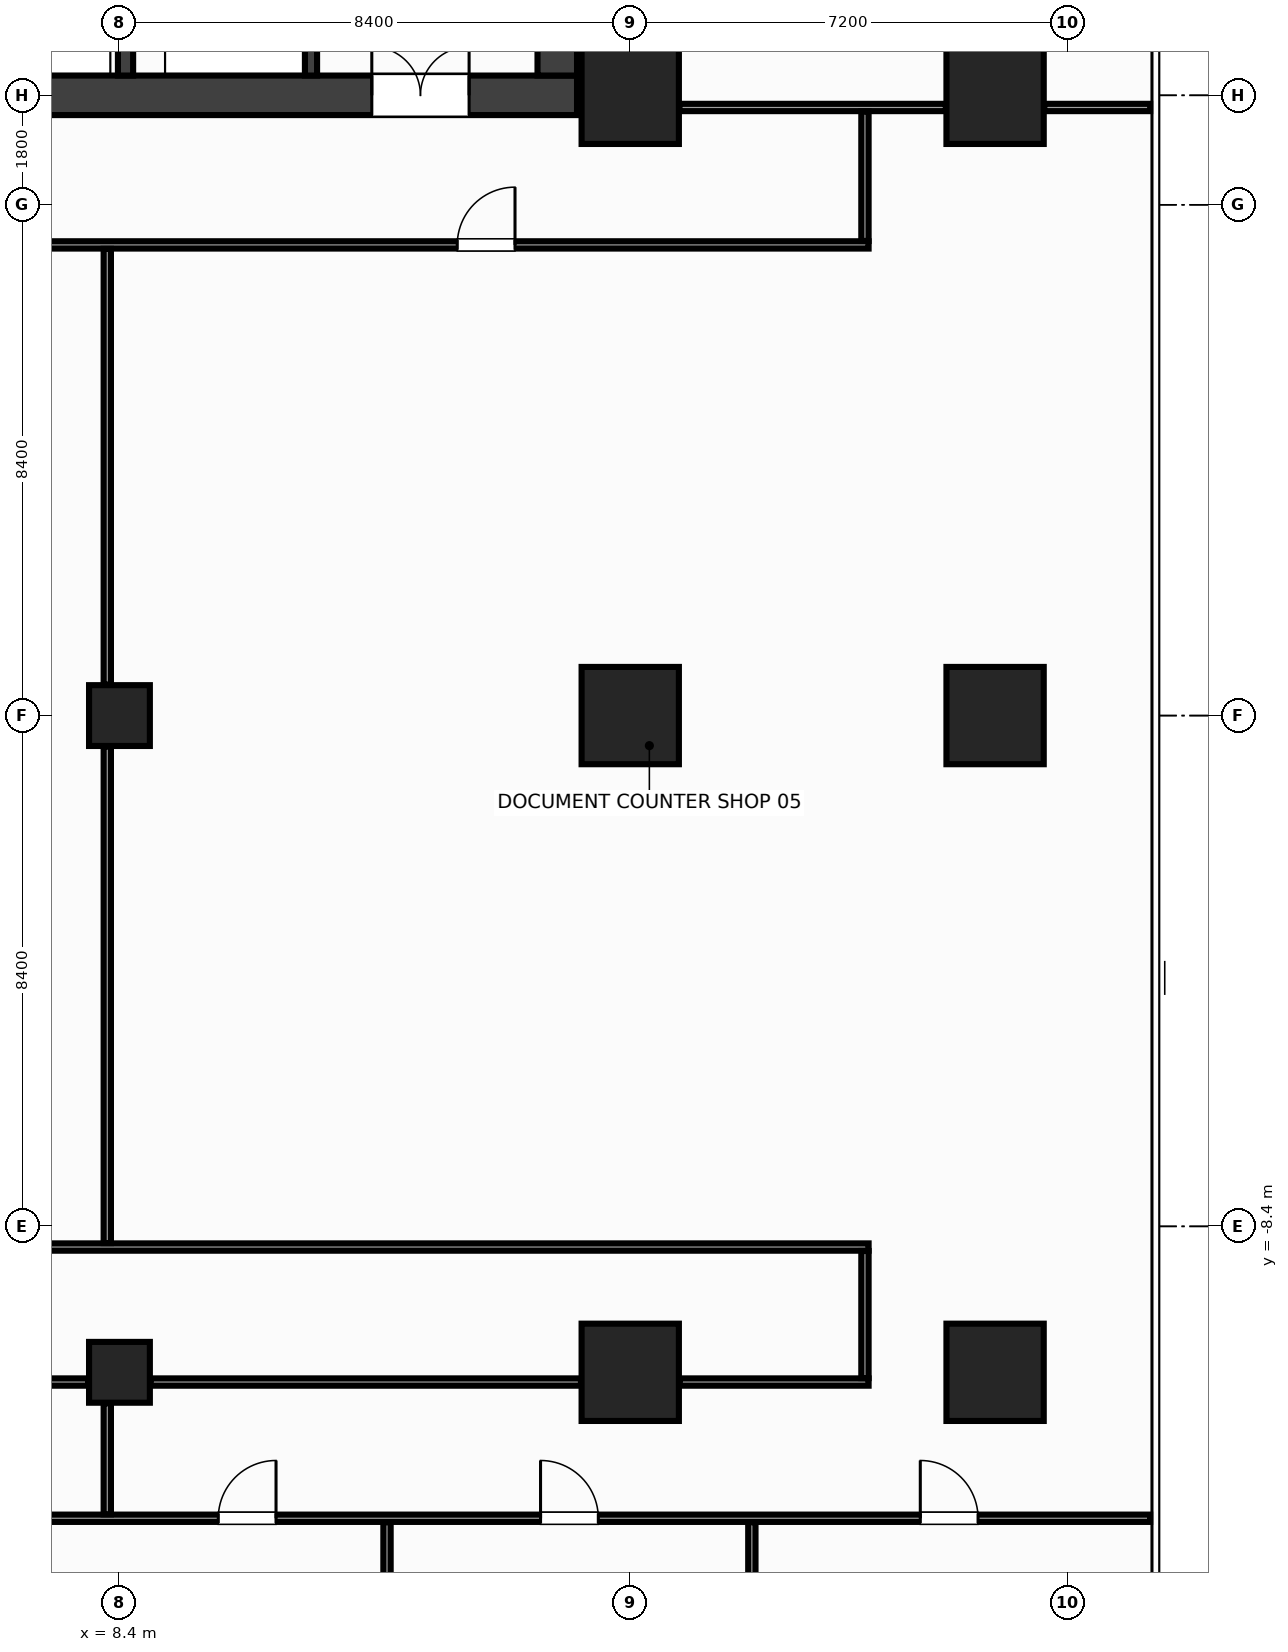
"""IFC4 building model, lengths in metres.
Left out: names, types, materials, properties, quantities, classifications, styles, units other than length and angle.
Written with IfcOpenShell. Run it as: python <this file> out.ifc"""

import sys

from ifc_helpers import new_model, si_unit, direction, frame, frame_2d, origin, origin_2d, place, context, subcontext, project, spatial, rectangle, hollow_rectangle, extrude, source, transform, mapped, element, fill, save


model = new_model("IFC4")
c1 = context("Model", 3, precision=1e-05, world=origin(), true_north=direction((0.0, 1.0)))
c2 = subcontext(c1, "Body", "Model", "MODEL_VIEW")
j1 = project(units=[si_unit("LENGTHUNIT", "METRE"), si_unit("PLANEANGLEUNIT", "RADIAN")], contexts=[c1])
p1 = place(None, origin())
s1 = spatial("IfcSite", under=j1, at=p1, CompositionType="ELEMENT")
p2 = place(p1, origin())
s2 = spatial("IfcBuilding", under=s1, at=p2, CompositionType="ELEMENT")
p3 = place(p2, frame((0.0, 0.0, 81.2)))
s3 = spatial("IfcBuildingStorey", under=s2, at=p3, CompositionType="ELEMENT", Elevation=81.2)
m1 = source(origin(), c2, "Body", "SweptSolid", [
    extrude(rectangle(XDim=31.85, YDim=0.65, at=frame_2d((15.925, 0.0))), origin(), (0.0, 0.0, 1.0), 3.6),
])
p4 = place(p3, frame((-15.925, 10.2, 0.0), z_axis=(0.0, 0.0, 1.0), x_axis=(1.0, 0.0, 0.0)))
e1 = element("IfcWall", 1, at=p4, inside=s3, PredefinedType="SHEAR", context=c2, shape_type="MappedRepresentation", body=[
    mapped(m1, transform((0.0, 0.0, 0.0), x_axis=(1.0, 0.0, 0.0), y_axis=(0.0, 1.0, 0.0), z_axis=(0.0, 0.0, 1.0), scale=1.0)),
])
p5 = place(p4, frame((1.775, 0.0, 0.0)))
e2 = element("IfcOpeningElement", 2, at=p5, cuts=e1, PredefinedType="OPENING", context=c2, shape_type="SweptSolid", body=[
    extrude(rectangle(XDim=1.6, YDim=2.15, at=frame_2d((0.8, 1.075))), frame((0.0, 0.337, 0.0), z_axis=(0.0, -1.0, 0.0), x_axis=(1.0, 0.0, 0.0)), (0.0, 0.0, 1.0), 0.674),
])
p6 = place(p4, frame((28.475, 0.0, 0.0)))
e3 = element("IfcOpeningElement", 3, at=p6, cuts=e1, PredefinedType="OPENING", context=c2, shape_type="SweptSolid", body=[
    extrude(rectangle(XDim=1.6, YDim=2.15, at=frame_2d((0.8, 1.075))), frame((0.0, 0.337, 0.0), z_axis=(0.0, -1.0, 0.0), x_axis=(1.0, 0.0, 0.0)), (0.0, 0.0, 1.0), 0.674),
])
p7 = place(p4, frame((15.175, 0.0, 0.0)))
e4 = element("IfcOpeningElement", 4, at=p7, cuts=e1, PredefinedType="OPENING", context=c2, shape_type="SweptSolid", body=[
    extrude(rectangle(XDim=1.5, YDim=2.2, at=frame_2d((0.75, 1.1))), frame((0.0, 0.337, 0.0), z_axis=(0.0, -1.0, 0.0), x_axis=(1.0, 0.0, 0.0)), (0.0, 0.0, 1.0), 0.674),
])
m2 = source(origin(), c2, "Body", "SweptSolid", [
    extrude(rectangle(XDim=12.95, YDim=0.65, at=frame_2d((6.475, 0.0))), origin(), (0.0, 0.0, 1.0), 3.6),
])
p8 = place(p3, frame((15.6, 10.525, 0.0), z_axis=(0.0, 0.0, 1.0), x_axis=(0.0, 1.0, 0.0)))
e5 = element("IfcWall", 5, at=p8, inside=s3, PredefinedType="SHEAR", context=c2, shape_type="MappedRepresentation", body=[
    mapped(m2, transform((0.0, 0.0, 0.0), x_axis=(1.0, 0.0, 0.0), y_axis=(0.0, 1.0, 0.0), z_axis=(0.0, 0.0, 1.0), scale=1.0)),
])
m3 = source(origin(), c2, "Body", "SweptSolid", [
    extrude(rectangle(XDim=12.95, YDim=0.25, at=frame_2d((6.475, 0.0))), origin(), (0.0, 0.0, 1.0), 3.6),
])
p9 = place(p3, frame((8.5, 10.525, 0.0), z_axis=(0.0, 0.0, 1.0), x_axis=(0.0, 1.0, 0.0)))
e6 = element("IfcWall", 6, at=p9, inside=s3, PredefinedType="SHEAR", context=c2, shape_type="MappedRepresentation", body=[
    mapped(m3, transform((0.0, 0.0, 0.0), x_axis=(1.0, 0.0, 0.0), y_axis=(0.0, 1.0, 0.0), z_axis=(0.0, 0.0, 1.0), scale=1.0)),
])
p10 = place(p9, frame((9.925, 0.0, 0.0)))
e7 = element("IfcOpeningElement", 7, at=p10, cuts=e6, PredefinedType="OPENING", context=c2, shape_type="SweptSolid", body=[
    extrude(rectangle(XDim=0.95, YDim=2.15, at=frame_2d((0.475, 1.075))), frame((0.0, 0.137, 0.0), z_axis=(0.0, -1.0, 0.0), x_axis=(1.0, 0.0, 0.0)), (0.0, 0.0, 1.0), 0.274),
])
m4 = source(origin(), c2, "Body", "SweptSolid", [
    extrude(rectangle(XDim=3.125, YDim=0.2, at=frame_2d((1.562, 0.0))), origin(), (0.0, 0.0, 1.0), 3.6),
])
p11 = place(p3, frame((11.55, 10.525, 0.0), z_axis=(0.0, 0.0, 1.0), x_axis=(0.0, 1.0, 0.0)))
e8 = element("IfcWall", 8, at=p11, inside=s3, PredefinedType="SHEAR", context=c2, shape_type="MappedRepresentation", body=[
    mapped(m4, transform((0.0, 0.0, 0.0), x_axis=(1.0, 0.0, 0.0), y_axis=(0.0, 1.0, 0.0), z_axis=(0.0, 0.0, 1.0), scale=1.0)),
])
p12 = place(p11, frame((0.9, 0.0, 0.0)))
e9 = element("IfcOpeningElement", 9, at=p12, cuts=e8, PredefinedType="OPENING", context=c2, shape_type="SweptSolid", body=[
    extrude(rectangle(XDim=1.1, YDim=2.15, at=frame_2d((0.55, 1.075))), frame((0.0, 0.112, 0.0), z_axis=(0.0, -1.0, 0.0), x_axis=(1.0, 0.0, 0.0)), (0.0, 0.0, 1.0), 0.224),
])
m5 = source(origin(), c2, "Body", "SweptSolid", [
    extrude(rectangle(XDim=1.6, YDim=1.6, at=origin_2d()), origin(), (0.0, 0.0, 1.0), 3.6),
])
for number, where, z_axis, x_axis in (
    (10, (16.8, -10.8, 0.0), (0.0, 0.0, 1.0), (1.0, 0.0, 0.0)),
    (11, (16.8, 0.0, 0.0), (0.0, 0.0, 1.0), (1.0, 0.0, 0.0)),
    (12, (16.8, 10.2, 0.0), (0.0, 0.0, 1.0), (1.0, 0.0, 0.0)),
    (13, (22.8, -10.8, 0.0), (0.0, 0.0, 1.0), (1.0, 0.0, 0.0)),
    (14, (22.8, 0.0, 0.0), (0.0, 0.0, 1.0), (1.0, 0.0, 0.0)),
    (15, (22.8, 10.2, 0.0), (0.0, 0.0, 1.0), (1.0, 0.0, 0.0)),
):
    element("IfcColumn", number, at=place(p3, frame(where, z_axis=z_axis, x_axis=x_axis)), inside=s3, PredefinedType="COLUMN", context=c2, shape_type="MappedRepresentation", body=[
        mapped(m5, transform((0.0, 0.0, 0.0), x_axis=(1.0, 0.0, 0.0), y_axis=(0.0, 1.0, 0.0), z_axis=(0.0, 0.0, 1.0), scale=1.0)),
    ])
m6 = source(origin(), c2, "Body", "SweptSolid", [
    extrude(hollow_rectangle(XDim=1.0, YDim=1.0, WallThickness=0.045, at=origin_2d()), origin(), (0.0, 0.0, 1.0), 3.6),
])
for number, where, z_axis, x_axis in (
    (16, (8.4, 0.0, 0.0), (0.0, 0.0, 1.0), (1.0, 0.0, 0.0)),
    (17, (8.4, -10.8, 0.0), (0.0, 0.0, 1.0), (1.0, 0.0, 0.0)),
):
    element("IfcColumn", number, at=place(p3, frame(where, z_axis=z_axis, x_axis=x_axis)), inside=s3, PredefinedType="COLUMN", context=c2, shape_type="MappedRepresentation", body=[
        mapped(m6, transform((0.0, 0.0, 0.0), x_axis=(1.0, 0.0, 0.0), y_axis=(0.0, 1.0, 0.0), z_axis=(0.0, 0.0, 1.0), scale=1.0)),
    ])
m7 = source(origin(), c2, "Body", "SweptSolid", [
    extrude(rectangle(XDim=4.38, YDim=0.12, at=frame_2d((2.19, 0.0))), origin(), (0.0, 0.0, 1.0), 2.745),
])
p13 = place(p3, frame((17.61, 10.0, 0.0), z_axis=(0.0, 0.0, 1.0), x_axis=(1.0, 0.0, 0.0)))
e18 = element("IfcWall", 18, at=p13, inside=s3, PredefinedType="PARTITIONING", context=c2, shape_type="MappedRepresentation", body=[
    mapped(m7, transform((0.0, 0.0, 0.0), x_axis=(1.0, 0.0, 0.0), y_axis=(0.0, 1.0, 0.0), z_axis=(0.0, 0.0, 1.0), scale=1.0)),
])
m8 = source(origin(), c2, "Body", "SweptSolid", [
    extrude(rectangle(XDim=1.74, YDim=0.12, at=frame_2d((0.87, 0.0))), origin(), (0.0, 0.0, 1.0), 3.36),
])
p14 = place(p3, frame((23.61, 10.0, 0.0), z_axis=(0.0, 0.0, 1.0), x_axis=(1.0, 0.0, 0.0)))
e19 = element("IfcWall", 19, at=p14, inside=s3, PredefinedType="PARTITIONING", context=c2, shape_type="MappedRepresentation", body=[
    mapped(m8, transform((0.0, 0.0, 0.0), x_axis=(1.0, 0.0, 0.0), y_axis=(0.0, 1.0, 0.0), z_axis=(0.0, 0.0, 1.0), scale=1.0)),
])
m9 = source(origin(), c2, "Body", "SweptSolid", [
    extrude(rectangle(XDim=22.3, YDim=0.12, at=frame_2d((11.15, 0.0))), origin(), (0.0, 0.0, 1.0), 2.745),
])
p15 = place(p3, frame((-1.58, 7.74, 0.0), z_axis=(0.0, 0.0, 1.0), x_axis=(1.0, 0.0, 0.0)))
e20 = element("IfcWall", 20, at=p15, inside=s3, PredefinedType="PARTITIONING", context=c2, shape_type="MappedRepresentation", body=[
    mapped(m9, transform((0.0, 0.0, 0.0), x_axis=(1.0, 0.0, 0.0), y_axis=(0.0, 1.0, 0.0), z_axis=(0.0, 0.0, 1.0), scale=1.0)),
])
p16 = place(p15, frame((4.445, 0.0, 0.0)))
e21 = element("IfcOpeningElement", 21, at=p16, cuts=e20, PredefinedType="OPENING", context=c2, shape_type="SweptSolid", body=[
    extrude(rectangle(XDim=0.95, YDim=2.15, at=frame_2d((0.475, 1.075))), frame((0.0, 0.072, 0.0), z_axis=(0.0, -1.0, 0.0), x_axis=(1.0, 0.0, 0.0)), (0.0, 0.0, 1.0), 0.144),
])
p17 = place(p15, frame((15.535, 0.0, 0.0)))
e22 = element("IfcOpeningElement", 22, at=p17, cuts=e20, PredefinedType="OPENING", context=c2, shape_type="SweptSolid", body=[
    extrude(rectangle(XDim=0.95, YDim=2.15, at=frame_2d((0.475, 1.075))), frame((0.0, 0.072, 0.0), z_axis=(0.0, -1.0, 0.0), x_axis=(1.0, 0.0, 0.0)), (0.0, 0.0, 1.0), 0.144),
])
p18 = place(p3, frame((-1.58, -8.74, 0.0), z_axis=(0.0, 0.0, 1.0), x_axis=(1.0, 0.0, 0.0)))
e23 = element("IfcWall", 23, at=p18, inside=s3, PredefinedType="PARTITIONING", context=c2, shape_type="MappedRepresentation", body=[
    mapped(m9, transform((0.0, 0.0, 0.0), x_axis=(1.0, 0.0, 0.0), y_axis=(0.0, 1.0, 0.0), z_axis=(0.0, 0.0, 1.0), scale=1.0)),
])
m10 = source(origin(), c2, "Body", "SweptSolid", [
    extrude(rectangle(XDim=7.38, YDim=0.12, at=frame_2d((3.69, 0.0))), origin(), (0.0, 0.0, 1.0), 2.745),
])
p19 = place(p3, frame((0.51, -10.96, 0.0), z_axis=(0.0, 0.0, 1.0), x_axis=(1.0, 0.0, 0.0)))
e24 = element("IfcWall", 24, at=p19, inside=s3, PredefinedType="PARTITIONING", context=c2, shape_type="MappedRepresentation", body=[
    mapped(m10, transform((0.0, 0.0, 0.0), x_axis=(1.0, 0.0, 0.0), y_axis=(0.0, 1.0, 0.0), z_axis=(0.0, 0.0, 1.0), scale=1.0)),
])
m11 = source(origin(), c2, "Body", "SweptSolid", [
    extrude(rectangle(XDim=7.08, YDim=0.12, at=frame_2d((3.54, 0.0))), origin(), (0.0, 0.0, 1.0), 2.745),
])
p20 = place(p3, frame((8.91, -10.96, 0.0), z_axis=(0.0, 0.0, 1.0), x_axis=(1.0, 0.0, 0.0)))
e25 = element("IfcWall", 25, at=p20, inside=s3, PredefinedType="PARTITIONING", context=c2, shape_type="MappedRepresentation", body=[
    mapped(m11, transform((0.0, 0.0, 0.0), x_axis=(1.0, 0.0, 0.0), y_axis=(0.0, 1.0, 0.0), z_axis=(0.0, 0.0, 1.0), scale=1.0)),
])
m12 = source(origin(), c2, "Body", "SweptSolid", [
    extrude(rectangle(XDim=3.11, YDim=0.12, at=frame_2d((1.555, 0.0))), origin(), (0.0, 0.0, 1.0), 2.745),
])
p21 = place(p3, frame((17.61, -10.96, 0.0), z_axis=(0.0, 0.0, 1.0), x_axis=(1.0, 0.0, 0.0)))
e26 = element("IfcWall", 26, at=p21, inside=s3, PredefinedType="PARTITIONING", context=c2, shape_type="MappedRepresentation", body=[
    mapped(m12, transform((0.0, 0.0, 0.0), x_axis=(1.0, 0.0, 0.0), y_axis=(0.0, 1.0, 0.0), z_axis=(0.0, 0.0, 1.0), scale=1.0)),
])
m13 = source(origin(), c2, "Body", "SweptSolid", [
    extrude(rectangle(XDim=2.13, YDim=0.12, at=frame_2d((1.065, 0.0))), origin(), (0.0, 0.0, 1.0), 3.36),
])
p22 = place(p3, frame((20.66, 7.805, 0.0), z_axis=(0.0, 0.0, 1.0), x_axis=(0.0, 1.0, 0.0)))
e27 = element("IfcWall", 27, at=p22, inside=s3, PredefinedType="PARTITIONING", context=c2, shape_type="MappedRepresentation", body=[
    mapped(m13, transform((0.0, 0.0, 0.0), x_axis=(1.0, 0.0, 0.0), y_axis=(0.0, 1.0, 0.0), z_axis=(0.0, 0.0, 1.0), scale=1.0)),
])
m14 = source(origin(), c2, "Body", "SweptSolid", [
    extrude(rectangle(XDim=2.09, YDim=0.12, at=frame_2d((1.045, 0.0))), origin(), (0.0, 0.0, 1.0), 3.36),
])
p23 = place(p3, frame((20.66, -10.895, 0.0), z_axis=(0.0, 0.0, 1.0), x_axis=(0.0, 1.0, 0.0)))
e28 = element("IfcWall", 28, at=p23, inside=s3, PredefinedType="PARTITIONING", context=c2, shape_type="MappedRepresentation", body=[
    mapped(m14, transform((0.0, 0.0, 0.0), x_axis=(1.0, 0.0, 0.0), y_axis=(0.0, 1.0, 0.0), z_axis=(0.0, 0.0, 1.0), scale=1.0)),
])
m15 = source(origin(), c2, "Body", "SweptSolid", [
    extrude(rectangle(XDim=50.7, YDim=0.12, at=frame_2d((25.35, 0.0))), origin(), (0.0, 0.0, 1.0), 2.945),
])
p24 = place(p3, frame((-25.35, -13.2, 0.0), z_axis=(0.0, 0.0, 1.0), x_axis=(1.0, 0.0, 0.0)))
e29 = element("IfcWall", 29, at=p24, inside=s3, PredefinedType="PARTITIONING", context=c2, shape_type="MappedRepresentation", body=[
    mapped(m15, transform((0.0, 0.0, 0.0), x_axis=(1.0, 0.0, 0.0), y_axis=(0.0, 1.0, 0.0), z_axis=(0.0, 0.0, 1.0), scale=1.0)),
])
p25 = place(p24, frame((46.92, 0.0, 0.0)))
e30 = element("IfcOpeningElement", 30, at=p25, cuts=e29, PredefinedType="OPENING", context=c2, shape_type="SweptSolid", body=[
    extrude(rectangle(XDim=0.95, YDim=2.15, at=frame_2d((0.475, 1.075))), frame((0.0, 0.072, 0.0), z_axis=(0.0, -1.0, 0.0), x_axis=(1.0, 0.0, 0.0)), (0.0, 0.0, 1.0), 0.144),
])
p26 = place(p24, frame((2.73, 0.0, 0.0)))
e31 = element("IfcOpeningElement", 31, at=p26, cuts=e29, PredefinedType="OPENING", context=c2, shape_type="SweptSolid", body=[
    extrude(rectangle(XDim=0.95, YDim=2.15, at=frame_2d((0.475, 1.075))), frame((0.0, 0.072, 0.0), z_axis=(0.0, -1.0, 0.0), x_axis=(1.0, 0.0, 0.0)), (0.0, 0.0, 1.0), 0.144),
])
p27 = place(p24, frame((9.375, 0.0, 0.0)))
e32 = element("IfcOpeningElement", 32, at=p27, cuts=e29, PredefinedType="OPENING", context=c2, shape_type="SweptSolid", body=[
    extrude(rectangle(XDim=0.95, YDim=2.15, at=frame_2d((0.475, 1.075))), frame((0.0, 0.072, 0.0), z_axis=(0.0, -1.0, 0.0), x_axis=(1.0, 0.0, 0.0)), (0.0, 0.0, 1.0), 0.144),
])
p28 = place(p24, frame((15.875, 0.0, 0.0)))
e33 = element("IfcOpeningElement", 33, at=p28, cuts=e29, PredefinedType="OPENING", context=c2, shape_type="SweptSolid", body=[
    extrude(rectangle(XDim=0.95, YDim=2.15, at=frame_2d((0.475, 1.075))), frame((0.0, 0.072, 0.0), z_axis=(0.0, -1.0, 0.0), x_axis=(1.0, 0.0, 0.0)), (0.0, 0.0, 1.0), 0.144),
])
p29 = place(p24, frame((24.875, 0.0, 0.0)))
e34 = element("IfcOpeningElement", 34, at=p29, cuts=e29, PredefinedType="OPENING", context=c2, shape_type="SweptSolid", body=[
    extrude(rectangle(XDim=0.95, YDim=2.15, at=frame_2d((0.475, 1.075))), frame((0.0, 0.072, 0.0), z_axis=(0.0, -1.0, 0.0), x_axis=(1.0, 0.0, 0.0)), (0.0, 0.0, 1.0), 0.144),
])
p30 = place(p24, frame((35.375, 0.0, 0.0)))
e35 = element("IfcOpeningElement", 35, at=p30, cuts=e29, PredefinedType="OPENING", context=c2, shape_type="SweptSolid", body=[
    extrude(rectangle(XDim=0.95, YDim=2.15, at=frame_2d((0.475, 1.075))), frame((0.0, 0.072, 0.0), z_axis=(0.0, -1.0, 0.0), x_axis=(1.0, 0.0, 0.0)), (0.0, 0.0, 1.0), 0.144),
])
p31 = place(p24, frame((40.675, 0.0, 0.0)))
e36 = element("IfcOpeningElement", 36, at=p31, cuts=e29, PredefinedType="OPENING", context=c2, shape_type="SweptSolid", body=[
    extrude(rectangle(XDim=0.95, YDim=2.15, at=frame_2d((0.475, 1.075))), frame((0.0, 0.072, 0.0), z_axis=(0.0, -1.0, 0.0), x_axis=(1.0, 0.0, 0.0)), (0.0, 0.0, 1.0), 0.144),
])
m16 = source(origin(), c2, "Body", "SweptSolid", [
    extrude(rectangle(XDim=1.825, YDim=0.12, at=frame_2d((0.913, 0.0))), origin(), (0.0, 0.0, 1.0), 2.945),
])
p32 = place(p3, frame((8.2, -13.135, 0.0), z_axis=(0.0, 0.0, 1.0), x_axis=(0.0, 1.0, 0.0)))
e37 = element("IfcWall", 37, at=p32, inside=s3, PredefinedType="PARTITIONING", context=c2, shape_type="MappedRepresentation", body=[
    mapped(m16, transform((0.0, 0.0, 0.0), x_axis=(1.0, 0.0, 0.0), y_axis=(0.0, 1.0, 0.0), z_axis=(0.0, 0.0, 1.0), scale=1.0)),
])
m17 = source(origin(), c2, "Body", "SweptSolid", [
    extrude(rectangle(XDim=8.165, YDim=0.12, at=frame_2d((4.083, 0.0))), origin(), (0.0, 0.0, 1.0), 2.745),
])
p33 = place(p3, frame((8.2, -8.675, 0.0), z_axis=(0.0, 0.0, 1.0), x_axis=(0.0, 1.0, 0.0)))
e38 = element("IfcWall", 38, at=p33, inside=s3, PredefinedType="PARTITIONING", context=c2, shape_type="MappedRepresentation", body=[
    mapped(m17, transform((0.0, 0.0, 0.0), x_axis=(1.0, 0.0, 0.0), y_axis=(0.0, 1.0, 0.0), z_axis=(0.0, 0.0, 1.0), scale=1.0)),
])
m18 = source(origin(), c2, "Body", "SweptSolid", [
    extrude(rectangle(XDim=7.165, YDim=0.12, at=frame_2d((3.583, 0.0))), origin(), (0.0, 0.0, 1.0), 2.645),
])
p34 = place(p3, frame((8.2, 0.51, 0.0), z_axis=(0.0, 0.0, 1.0), x_axis=(0.0, 1.0, 0.0)))
e39 = element("IfcWall", 39, at=p34, inside=s3, PredefinedType="PARTITIONING", context=c2, shape_type="MappedRepresentation", body=[
    mapped(m18, transform((0.0, 0.0, 0.0), x_axis=(1.0, 0.0, 0.0), y_axis=(0.0, 1.0, 0.0), z_axis=(0.0, 0.0, 1.0), scale=1.0)),
])
m19 = source(origin(), c2, "Body", "SweptSolid", [
    extrude(rectangle(XDim=12.385, YDim=0.12, at=frame_2d((6.192, 0.0))), origin(), (0.0, 0.0, 1.0), 2.745),
])
for number, where, z_axis, x_axis in (
    (40, (12.8, -25.65, 0.0), (0.0, 0.0, 1.0), (0.0, 1.0, 0.0)),
    (41, (18.8, -25.65, 0.0), (0.0, 0.0, 1.0), (0.0, 1.0, 0.0)),
):
    element("IfcWall", number, at=place(p3, frame(where, z_axis=z_axis, x_axis=x_axis)), inside=s3, PredefinedType="PARTITIONING", context=c2, shape_type="MappedRepresentation", body=[
        mapped(m19, transform((0.0, 0.0, 0.0), x_axis=(1.0, 0.0, 0.0), y_axis=(0.0, 1.0, 0.0), z_axis=(0.0, 0.0, 1.0), scale=1.0)),
    ])
m20 = source(origin(), c2, "Body", "SweptSolid", [
    extrude(rectangle(XDim=1.6, YDim=2.15, at=frame_2d((0.8, 1.075))), frame((0.0, 0.025, 0.0), z_axis=(0.0, -1.0, 0.0), x_axis=(1.0, 0.0, 0.0)), (0.0, 0.0, 1.0), 0.05),
])
p35 = place(p6, origin())
e42 = element("IfcDoor", 42, at=p35, inside=s3, OperationType="DOUBLE_DOOR_SINGLE_SWING", PredefinedType="DOOR", context=c2, shape_type="MappedRepresentation", body=[
    mapped(m20, transform((0.0, 0.0, 0.0), x_axis=(1.0, 0.0, 0.0), y_axis=(0.0, 1.0, 0.0), z_axis=(0.0, 0.0, 1.0), scale=1.0)),
])
fill(e3, e42)
m21 = source(origin(), c2, "Body", "SweptSolid", [
    extrude(rectangle(XDim=0.95, YDim=2.15, at=frame_2d((0.475, 1.075))), frame((0.0, 0.025, 0.0), z_axis=(0.0, -1.0, 0.0), x_axis=(1.0, 0.0, 0.0)), (0.0, 0.0, 1.0), 0.05),
])
p36 = place(p17, origin())
e43 = element("IfcDoor", 43, at=p36, inside=s3, OperationType="SINGLE_SWING_RIGHT", PredefinedType="DOOR", context=c2, shape_type="MappedRepresentation", body=[
    mapped(m21, transform((0.0, 0.0, 0.0), x_axis=(1.0, 0.0, 0.0), y_axis=(0.0, 1.0, 0.0), z_axis=(0.0, 0.0, 1.0), scale=1.0)),
])
fill(e22, e43)
p37 = place(p25, origin())
e44 = element("IfcDoor", 44, at=p37, inside=s3, OperationType="SINGLE_SWING_LEFT", PredefinedType="DOOR", context=c2, shape_type="MappedRepresentation", body=[
    mapped(m21, transform((0.0, 0.0, 0.0), x_axis=(1.0, 0.0, 0.0), y_axis=(0.0, 1.0, 0.0), z_axis=(0.0, 0.0, 1.0), scale=1.0)),
])
fill(e30, e44)
p38 = place(p30, origin())
e45 = element("IfcDoor", 45, at=p38, inside=s3, OperationType="SINGLE_SWING_RIGHT", PredefinedType="DOOR", context=c2, shape_type="MappedRepresentation", body=[
    mapped(m21, transform((0.0, 0.0, 0.0), x_axis=(1.0, 0.0, 0.0), y_axis=(0.0, 1.0, 0.0), z_axis=(0.0, 0.0, 1.0), scale=1.0)),
])
fill(e35, e45)
p39 = place(p31, origin())
e46 = element("IfcDoor", 46, at=p39, inside=s3, OperationType="SINGLE_SWING_LEFT", PredefinedType="DOOR", context=c2, shape_type="MappedRepresentation", body=[
    mapped(m21, transform((0.0, 0.0, 0.0), x_axis=(1.0, 0.0, 0.0), y_axis=(0.0, 1.0, 0.0), z_axis=(0.0, 0.0, 1.0), scale=1.0)),
])
fill(e36, e46)
save(model, sys.argv[1])
